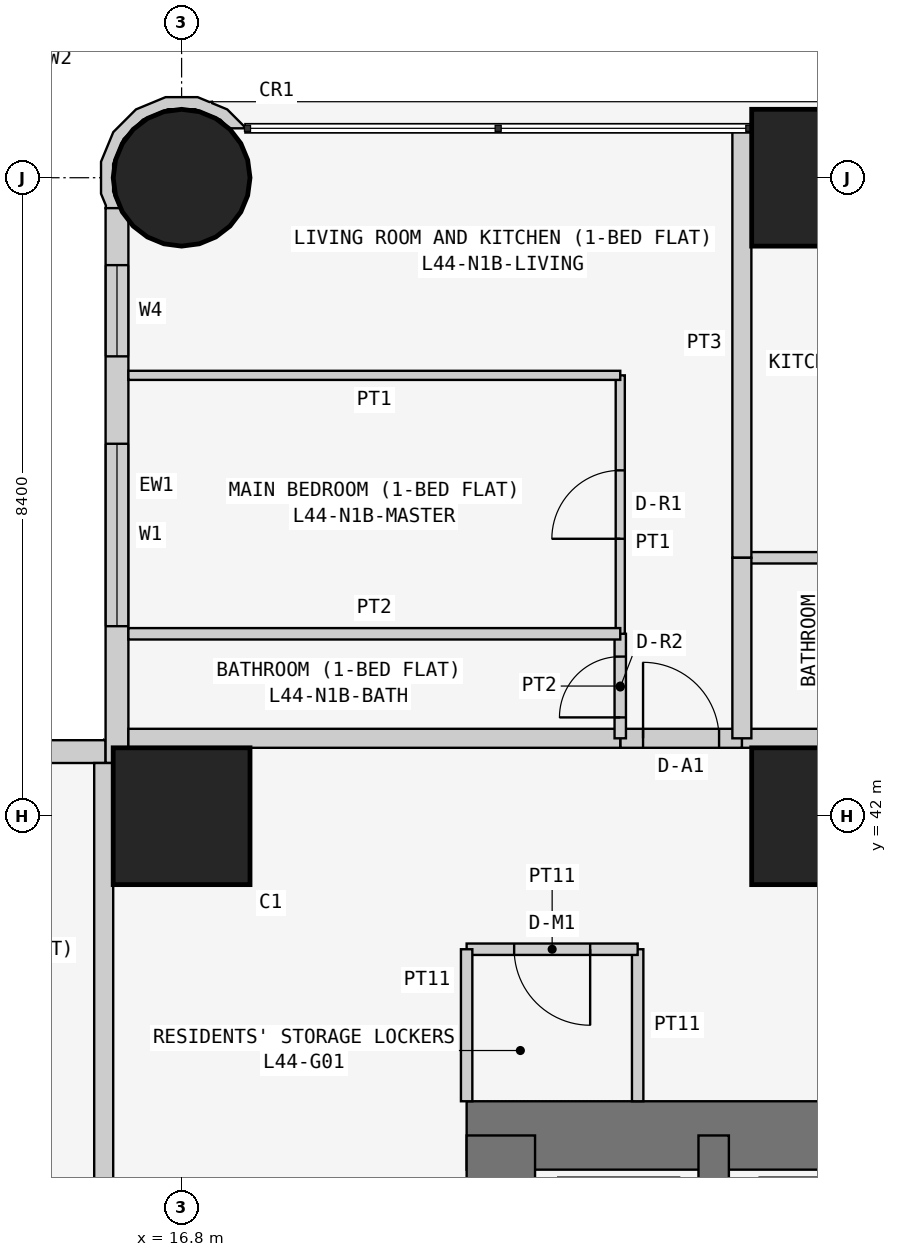
"""IFC4 building model, lengths in metres.
Left out: names, types, materials, properties, quantities, classifications, styles, units other than length and angle.
Written with IfcOpenShell. Run it as: python <this file> out.ifc"""

import sys

from ifc_helpers import new_model, si_unit, direction, frame, frame_2d, origin, origin_2d, place, context, subcontext, project, spatial, polyline, rectangle, circle, outline, extrude, element, fill, save


model = new_model("IFC4")
c1 = context("Model", 3, precision=1e-05, world=origin(), true_north=direction((0.0, 1.0)))
c2 = subcontext(c1, "Body", "Model", "MODEL_VIEW")
j1 = project(units=[si_unit("LENGTHUNIT", "METRE"), si_unit("PLANEANGLEUNIT", "RADIAN")], contexts=[c1])
p1 = place(None, origin())
s1 = spatial("IfcSite", under=j1, at=p1, CompositionType="ELEMENT")
p2 = place(p1, origin())
s2 = spatial("IfcBuilding", under=s1, at=p2, CompositionType="ELEMENT")
p3 = place(p2, frame((0.0, 0.0, 170.1)))
s3 = spatial("IfcBuildingStorey", under=s2, at=p3, CompositionType="ELEMENT", Elevation=170.1)
p4 = place(p3, frame((16.8, 42.0, 0.0), z_axis=(0.0, 0.0, 1.0), x_axis=(1.0, 0.0, 0.0)))
e1 = element("IfcColumn", 1, at=p4, inside=s3, PredefinedType="COLUMN", context=c2, shape_type="SweptSolid", body=[
    extrude(rectangle(XDim=1.8, YDim=1.8, at=origin_2d()), origin(), (0.0, 0.0, 1.0), 3.6),
])
p5 = place(p3, frame((16.8, 50.4, 0.0), z_axis=(0.0, 0.0, 1.0), x_axis=(1.0, 0.0, 0.0)))
e2 = element("IfcColumn", 2, at=p5, inside=s3, PredefinedType="COLUMN", context=c2, shape_type="SweptSolid", body=[
    extrude(circle(Radius=0.9, at=origin_2d()), origin(), (0.0, 0.0, 1.0), 3.6),
])
for number, where, z_axis, x_axis in (
    (3, (25.2, 42.0, 0.0), (0.0, 0.0, 1.0), (1.0, 0.0, 0.0)),
    (4, (25.2, 50.4, 0.0), (0.0, 0.0, 1.0), (1.0, 0.0, 0.0)),
):
    element("IfcColumn", number, at=place(p3, frame(where, z_axis=z_axis, x_axis=x_axis)), inside=s3, PredefinedType="COLUMN", context=c2, shape_type="SweptSolid", body=[
        extrude(rectangle(XDim=1.8, YDim=1.8, at=origin_2d()), origin(), (0.0, 0.0, 1.0), 3.6),
    ])
p6 = place(p3, frame((37.8, 37.8, 0.0), z_axis=(0.0, 0.0, 1.0), x_axis=(-1.0, 0.0, 0.0)))
e5 = element("IfcWall", 5, at=p6, inside=s3, PredefinedType="SHEAR", context=c2, shape_type="SweptSolid", body=[
    extrude(rectangle(XDim=17.25, YDim=0.9, at=frame_2d((8.625, 0.0))), origin(), (0.0, 0.0, 1.0), 3.6),
])
p7 = place(p3, frame((21.0, 37.8, 0.0), z_axis=(0.0, 0.0, 1.0), x_axis=(0.0, -1.0, 0.0)))
e6 = element("IfcWall", 6, at=p7, inside=s3, PredefinedType="SHEAR", context=c2, shape_type="SweptSolid", body=[
    extrude(rectangle(XDim=17.25, YDim=0.9, at=frame_2d((8.625, 0.0))), origin(), (0.0, 0.0, 1.0), 3.6),
])
p8 = place(p7, frame((5.4, 0.0, 0.0)))
e7 = element("IfcOpeningElement", 7, at=p8, cuts=e6, PredefinedType="OPENING", context=c2, shape_type="SweptSolid", body=[
    extrude(rectangle(XDim=1.2, YDim=2.1, at=frame_2d((0.6, 1.05))), frame((0.0, 0.46, 0.0), z_axis=(0.0, -1.0, 0.0), x_axis=(1.0, 0.0, 0.0)), (0.0, 0.0, 1.0), 0.92),
])
p9 = place(p3, frame((23.8, 34.6, 0.0), z_axis=(0.0, 0.0, 1.0), x_axis=(0.0, 1.0, 0.0)))
e8 = element("IfcWall", 8, at=p9, inside=s3, PredefinedType="SHEAR", context=c2, shape_type="SweptSolid", body=[
    extrude(rectangle(XDim=3.2, YDim=0.4, at=frame_2d((1.6, 0.0))), origin(), (0.0, 0.0, 1.0), 3.6),
])
p10 = place(p3, frame((15.8, 42.85, 0.0), z_axis=(0.0, 0.0, 1.0), x_axis=(-1.0, 0.0, 0.0)))
e9 = element("IfcWall", 9, at=p10, inside=s3, PredefinedType="SOLIDWALL", context=c2, shape_type="SweptSolid", body=[
    extrude(rectangle(XDim=15.4, YDim=0.3, at=frame_2d((7.7, 0.0))), origin(), (0.0, 0.0, 1.0), 3.45),
])
p11 = place(p10, frame((1.2, 0.0, 0.9)))
e10 = element("IfcOpeningElement", 10, at=p11, cuts=e9, PredefinedType="OPENING", context=c2, shape_type="SweptSolid", body=[
    extrude(rectangle(XDim=1.8, YDim=1.5, at=frame_2d((0.9, 0.75))), frame((0.0, 0.16, 0.0), z_axis=(0.0, -1.0, 0.0), x_axis=(1.0, 0.0, 0.0)), (0.0, 0.0, 1.0), 0.32),
])
p12 = place(p10, frame((4.95, 0.0, 1.5)))
e11 = element("IfcOpeningElement", 11, at=p12, cuts=e9, PredefinedType="OPENING", context=c2, shape_type="SweptSolid", body=[
    extrude(rectangle(XDim=0.9, YDim=0.7, at=frame_2d((0.45, 0.35))), frame((0.0, 0.16, 0.0), z_axis=(0.0, -1.0, 0.0), x_axis=(1.0, 0.0, 0.0)), (0.0, 0.0, 1.0), 0.32),
])
p13 = place(p10, frame((8.5, 0.0, 0.9)))
e12 = element("IfcOpeningElement", 12, at=p13, cuts=e9, PredefinedType="OPENING", context=c2, shape_type="SweptSolid", body=[
    extrude(rectangle(XDim=1.8, YDim=1.5, at=frame_2d((0.9, 0.75))), frame((0.0, 0.16, 0.0), z_axis=(0.0, -1.0, 0.0), x_axis=(1.0, 0.0, 0.0)), (0.0, 0.0, 1.0), 0.32),
])
p14 = place(p10, frame((12.5, 0.0, 0.0)))
e13 = element("IfcOpeningElement", 13, at=p14, cuts=e9, PredefinedType="OPENING", context=c2, shape_type="SweptSolid", body=[
    extrude(rectangle(XDim=0.9, YDim=2.4, at=frame_2d((0.45, 1.2))), frame((0.0, 0.16, 0.0), z_axis=(0.0, -1.0, 0.0), x_axis=(1.0, 0.0, 0.0)), (0.0, 0.0, 1.0), 0.32),
])
p15 = place(p10, frame((13.5, 0.0, 0.9)))
e14 = element("IfcOpeningElement", 14, at=p15, cuts=e9, PredefinedType="OPENING", context=c2, shape_type="SweptSolid", body=[
    extrude(rectangle(XDim=1.2, YDim=1.5, at=frame_2d((0.6, 0.75))), frame((0.0, 0.16, 0.0), z_axis=(0.0, -1.0, 0.0), x_axis=(1.0, 0.0, 0.0)), (0.0, 0.0, 1.0), 0.32),
])
p16 = place(p3, frame((15.95, 50.0, 0.0), z_axis=(0.0, 0.0, 1.0), x_axis=(0.0, -1.0, 0.0)))
e15 = element("IfcWall", 15, at=p16, inside=s3, PredefinedType="SOLIDWALL", context=c2, shape_type="SweptSolid", body=[
    extrude(rectangle(XDim=7.3, YDim=0.3, at=frame_2d((3.65, 0.0))), origin(), (0.0, 0.0, 1.0), 3.45),
])
p17 = place(p16, frame((3.1, 0.0, 0.9)))
e16 = element("IfcOpeningElement", 16, at=p17, cuts=e15, PredefinedType="OPENING", context=c2, shape_type="SweptSolid", body=[
    extrude(rectangle(XDim=2.4, YDim=1.5, at=frame_2d((1.2, 0.75))), frame((0.0, 0.16, 0.0), z_axis=(0.0, -1.0, 0.0), x_axis=(1.0, 0.0, 0.0)), (0.0, 0.0, 1.0), 0.32),
])
p18 = place(p16, frame((0.75, 0.0, 0.9)))
e17 = element("IfcOpeningElement", 17, at=p18, cuts=e15, PredefinedType="OPENING", context=c2, shape_type="SweptSolid", body=[
    extrude(rectangle(XDim=1.2, YDim=1.5, at=frame_2d((0.6, 0.75))), frame((0.0, 0.16, 0.0), z_axis=(0.0, -1.0, 0.0), x_axis=(1.0, 0.0, 0.0)), (0.0, 0.0, 1.0), 0.32),
])
p19 = place(p3, frame((17.567, 51.011, 0.0), z_axis=(0.0, 0.0, 1.0), x_axis=(-0.377204953059, 0.926129809145, 0.0)))
e18 = element("IfcWall", 18, at=p19, inside=s3, PredefinedType="SOLIDWALL", context=c2, shape_type="SweptSolid", body=[
    extrude(outline(polyline([(-0.27, 2.017), (-0.37, 1.841), (-0.102, 1.842), (0.23, 1.707), (0.485, 1.455), (0.624, 1.125), (0.626, 0.766), (0.491, 0.434), (0.239, 0.18), (0.09, 0.117), (0.011, -0.078), (0.025, -0.083), (0.329, 0.045), (0.48, 0.197), (0.499, 0.193), (0.507, 0.225), (0.626, 0.345), (0.785, 0.736), (0.782, 1.157), (0.619, 1.546), (0.319, 1.842), (-0.072, 2.001), (-0.24, 2.0), (-0.27, 2.017)])), origin(), (0.0, 0.0, 1.0), 3.45),
])
p20 = place(p3, frame((22.8, 38.25, 0.0), z_axis=(0.0, 0.0, 1.0), x_axis=(0.0, 1.0, 0.0)))
e19 = element("IfcWall", 19, at=p20, inside=s3, PredefinedType="PARTITIONING", context=c2, shape_type="SweptSolid", body=[
    extrude(rectangle(XDim=2.0, YDim=0.15, at=frame_2d((1.0, 0.0))), origin(), (0.0, 0.0, 1.0), 3.45),
])
p21 = place(p3, frame((22.8, 40.25, 0.0), z_axis=(0.0, 0.0, 1.0), x_axis=(-1.0, 0.0, 0.0)))
e20 = element("IfcWall", 20, at=p21, inside=s3, PredefinedType="PARTITIONING", context=c2, shape_type="SweptSolid", body=[
    extrude(rectangle(XDim=2.25, YDim=0.15, at=frame_2d((1.125, 0.0))), origin(), (0.0, 0.0, 1.0), 3.45),
])
p22 = place(p21, frame((0.625, 0.0, 0.0)))
e21 = element("IfcOpeningElement", 21, at=p22, cuts=e20, PredefinedType="OPENING", context=c2, shape_type="SweptSolid", body=[
    extrude(rectangle(XDim=1.0, YDim=2.1, at=frame_2d((0.5, 1.05))), frame((0.0, 0.085, 0.0), z_axis=(0.0, -1.0, 0.0), x_axis=(1.0, 0.0, 0.0)), (0.0, 0.0, 1.0), 0.17),
])
p23 = place(p3, frame((20.55, 40.25, 0.0), z_axis=(0.0, 0.0, 1.0), x_axis=(0.0, -1.0, 0.0)))
e22 = element("IfcWall", 22, at=p23, inside=s3, PredefinedType="PARTITIONING", context=c2, shape_type="SweptSolid", body=[
    extrude(rectangle(XDim=2.0, YDim=0.15, at=frame_2d((1.0, 0.0))), origin(), (0.0, 0.0, 1.0), 3.45),
])
p24 = place(p3, frame((24.171, 43.025, 0.0), z_axis=(0.0, 0.0, 1.0), x_axis=(1.0, 0.0, 0.0)))
e23 = element("IfcWall", 23, at=p24, inside=s3, PredefinedType="PARTITIONING", context=c2, shape_type="SweptSolid", body=[
    extrude(rectangle(XDim=2.629, YDim=0.25, at=frame_2d((1.314, 0.0))), origin(), (0.0, 0.0, 1.0), 3.45),
])
p25 = place(p3, frame((22.571, 43.025, 0.0), z_axis=(0.0, 0.0, 1.0), x_axis=(1.0, 0.0, 0.0)))
e24 = element("IfcWall", 24, at=p25, inside=s3, PredefinedType="PARTITIONING", context=c2, shape_type="SweptSolid", body=[
    extrude(rectangle(XDim=1.6, YDim=0.25, at=frame_2d((0.8, 0.0))), origin(), (0.0, 0.0, 1.0), 3.45),
])
p26 = place(p25, frame((0.3, 0.0, 0.0)))
e25 = element("IfcOpeningElement", 25, at=p26, cuts=e24, PredefinedType="OPENING", context=c2, shape_type="SweptSolid", body=[
    extrude(rectangle(XDim=1.0, YDim=2.1, at=frame_2d((0.5, 1.05))), frame((0.0, 0.135, 0.0), z_axis=(0.0, -1.0, 0.0), x_axis=(1.0, 0.0, 0.0)), (0.0, 0.0, 1.0), 0.27),
])
for number, where, z_axis, x_axis in (
    (26, (16.1, 43.025, 0.0), (0.0, 0.0, 1.0), (1.0, 0.0, 0.0)),
    (27, (15.775, 36.229, 0.0), (0.0, 0.0, 1.0), (0.0, 1.0, 0.0)),
):
    element("IfcWall", number, at=place(p3, frame(where, z_axis=z_axis, x_axis=x_axis)), inside=s3, PredefinedType="PARTITIONING", context=c2, shape_type="SweptSolid", body=[
        extrude(rectangle(XDim=6.471, YDim=0.25, at=frame_2d((3.235, 0.0))), origin(), (0.0, 0.0, 1.0), 3.45),
    ])
p27 = place(p3, frame((26.8, 45.4, 0.0), z_axis=(0.0, 0.0, 1.0), x_axis=(-1.0, 0.0, 0.0)))
e28 = element("IfcWall", 28, at=p27, inside=s3, PredefinedType="PARTITIONING", context=c2, shape_type="SweptSolid", body=[
    extrude(rectangle(XDim=2.629, YDim=0.15, at=frame_2d((1.314, 0.0))), origin(), (0.0, 0.0, 1.0), 3.45),
])
p28 = place(p3, frame((24.171, 45.4, 0.0), z_axis=(0.0, 0.0, 1.0), x_axis=(0.0, 1.0, 0.0)))
e29 = element("IfcWall", 29, at=p28, inside=s3, PredefinedType="PARTITIONING", context=c2, shape_type="SweptSolid", body=[
    extrude(rectangle(XDim=5.65, YDim=0.25, at=frame_2d((2.825, 0.0))), origin(), (0.0, 0.0, 1.0), 3.45),
])
p29 = place(p3, frame((24.171, 45.4, 0.0), z_axis=(0.0, 0.0, 1.0), x_axis=(0.0, -1.0, 0.0)))
e30 = element("IfcWall", 30, at=p29, inside=s3, PredefinedType="PARTITIONING", context=c2, shape_type="SweptSolid", body=[
    extrude(rectangle(XDim=2.375, YDim=0.25, at=frame_2d((1.188, 0.0))), origin(), (0.0, 0.0, 1.0), 3.45),
])
p30 = place(p3, frame((22.571, 43.025, 0.0), z_axis=(0.0, 0.0, 1.0), x_axis=(0.0, 1.0, 0.0)))
e31 = element("IfcWall", 31, at=p30, inside=s3, PredefinedType="PARTITIONING", context=c2, shape_type="SweptSolid", body=[
    extrude(rectangle(XDim=1.375, YDim=0.15, at=frame_2d((0.688, 0.0))), origin(), (0.0, 0.0, 1.0), 3.45),
])
p31 = place(p30, frame((0.275, 0.0, 0.0)))
e32 = element("IfcOpeningElement", 32, at=p31, cuts=e31, PredefinedType="OPENING", context=c2, shape_type="SweptSolid", body=[
    extrude(rectangle(XDim=0.8, YDim=2.1, at=frame_2d((0.4, 1.05))), frame((0.0, 0.085, 0.0), z_axis=(0.0, -1.0, 0.0), x_axis=(1.0, 0.0, 0.0)), (0.0, 0.0, 1.0), 0.17),
])
p32 = place(p3, frame((22.571, 44.4, 0.0), z_axis=(0.0, 0.0, 1.0), x_axis=(0.0, 1.0, 0.0)))
e33 = element("IfcWall", 33, at=p32, inside=s3, PredefinedType="PARTITIONING", context=c2, shape_type="SweptSolid", body=[
    extrude(rectangle(XDim=3.4, YDim=0.12, at=frame_2d((1.7, 0.0))), origin(), (0.0, 0.0, 1.0), 3.45),
])
p33 = place(p32, frame((1.25, 0.0, 0.0)))
e34 = element("IfcOpeningElement", 34, at=p33, cuts=e33, PredefinedType="OPENING", context=c2, shape_type="SweptSolid", body=[
    extrude(rectangle(XDim=0.9, YDim=2.1, at=frame_2d((0.45, 1.05))), frame((0.0, 0.07, 0.0), z_axis=(0.0, -1.0, 0.0), x_axis=(1.0, 0.0, 0.0)), (0.0, 0.0, 1.0), 0.14),
])
p34 = place(p3, frame((22.571, 47.8, 0.0), z_axis=(0.0, 0.0, 1.0), x_axis=(-1.0, 0.0, 0.0)))
e35 = element("IfcWall", 35, at=p34, inside=s3, PredefinedType="PARTITIONING", context=c2, shape_type="SweptSolid", body=[
    extrude(rectangle(XDim=6.471, YDim=0.12, at=frame_2d((3.235, 0.0))), origin(), (0.0, 0.0, 1.0), 3.45),
])
p35 = place(p3, frame((22.571, 44.4, 0.0), z_axis=(0.0, 0.0, 1.0), x_axis=(-1.0, 0.0, 0.0)))
e36 = element("IfcWall", 36, at=p35, inside=s3, PredefinedType="PARTITIONING", context=c2, shape_type="SweptSolid", body=[
    extrude(rectangle(XDim=6.471, YDim=0.15, at=frame_2d((3.235, 0.0))), origin(), (0.0, 0.0, 1.0), 3.45),
])
p36 = place(p17, origin())
e37 = element("IfcWindow", 37, at=p36, inside=s3, PartitioningType="SINGLE_PANEL", PredefinedType="WINDOW", context=c2, shape_type="SweptSolid", body=[
    extrude(rectangle(XDim=2.4, YDim=1.5, at=frame_2d((1.2, 0.75))), frame((0.0, 0.03, 0.0), z_axis=(0.0, -1.0, 0.0), x_axis=(1.0, 0.0, 0.0)), (0.0, 0.0, 1.0), 0.06),
])
fill(e16, e37)
p37 = place(p18, origin())
e38 = element("IfcWindow", 38, at=p37, inside=s3, PartitioningType="SINGLE_PANEL", PredefinedType="WINDOW", context=c2, shape_type="SweptSolid", body=[
    extrude(rectangle(XDim=1.2, YDim=1.5, at=frame_2d((0.6, 0.75))), frame((0.0, 0.03, 0.0), z_axis=(0.0, -1.0, 0.0), x_axis=(1.0, 0.0, 0.0)), (0.0, 0.0, 1.0), 0.06),
])
fill(e17, e38)
p38 = place(p22, origin())
e39 = element("IfcDoor", 39, at=p38, inside=s3, OperationType="SINGLE_SWING_LEFT", PredefinedType="DOOR", context=c2, shape_type="SweptSolid", body=[
    extrude(rectangle(XDim=1.0, YDim=2.1, at=frame_2d((0.5, 1.05))), frame((0.0, 0.025, 0.0), z_axis=(0.0, -1.0, 0.0), x_axis=(1.0, 0.0, 0.0)), (0.0, 0.0, 1.0), 0.05),
])
fill(e21, e39)
p39 = place(p26, origin())
e40 = element("IfcDoor", 40, at=p39, inside=s3, OperationType="SINGLE_SWING_LEFT", PredefinedType="DOOR", context=c2, shape_type="SweptSolid", body=[
    extrude(rectangle(XDim=1.0, YDim=2.1, at=frame_2d((0.5, 1.05))), frame((0.0, 0.025, 0.0), z_axis=(0.0, -1.0, 0.0), x_axis=(1.0, 0.0, 0.0)), (0.0, 0.0, 1.0), 0.05),
])
fill(e25, e40)
p40 = place(p31, origin())
e41 = element("IfcDoor", 41, at=p40, inside=s3, OperationType="SINGLE_SWING_LEFT", PredefinedType="DOOR", context=c2, shape_type="SweptSolid", body=[
    extrude(rectangle(XDim=0.8, YDim=2.1, at=frame_2d((0.4, 1.05))), frame((0.0, 0.025, 0.0), z_axis=(0.0, -1.0, 0.0), x_axis=(1.0, 0.0, 0.0)), (0.0, 0.0, 1.0), 0.05),
])
fill(e32, e41)
p41 = place(p33, origin())
e42 = element("IfcDoor", 42, at=p41, inside=s3, OperationType="SINGLE_SWING_LEFT", PredefinedType="DOOR", context=c2, shape_type="SweptSolid", body=[
    extrude(rectangle(XDim=0.9, YDim=2.1, at=frame_2d((0.45, 1.05))), frame((0.0, 0.025, 0.0), z_axis=(0.0, -1.0, 0.0), x_axis=(1.0, 0.0, 0.0)), (0.0, 0.0, 1.0), 0.05),
])
fill(e34, e42)
save(model, sys.argv[1])
